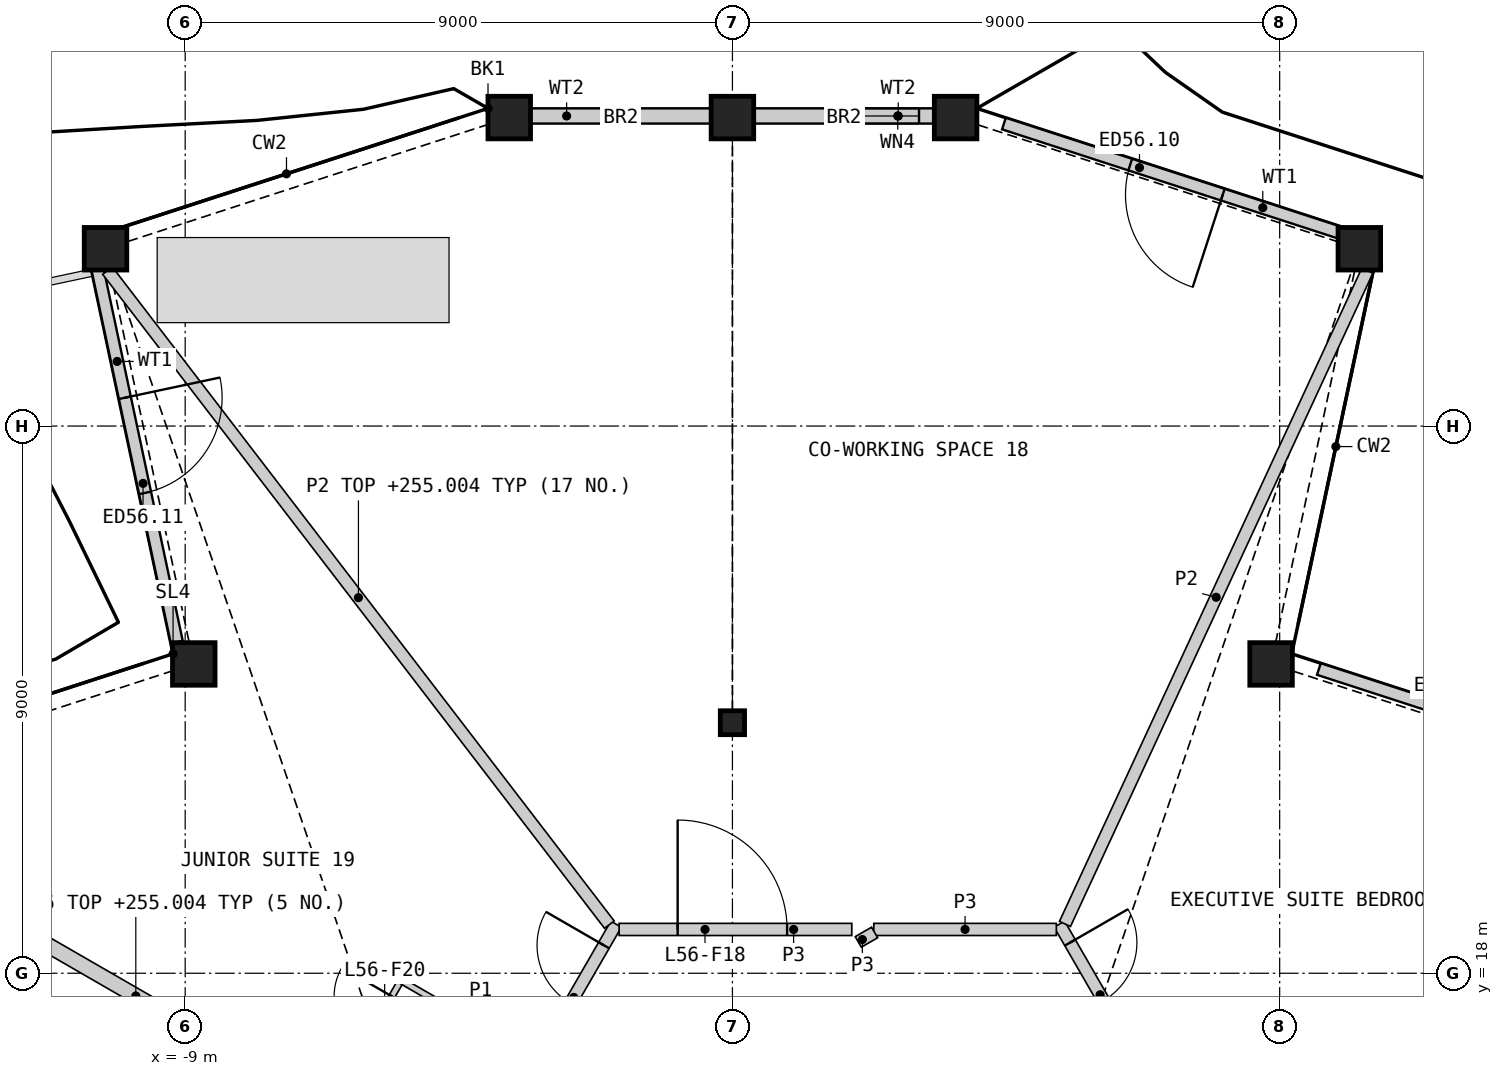
"""IFC4 building model, lengths in metres.
Left out: names, types, materials, properties, quantities, classifications, styles, units other than length and angle.
Written with IfcOpenShell. Run it as: python <this file> out.ifc"""

import sys

from ifc_helpers import new_model, si_unit, direction, frame, frame_2d, origin, origin_2d, place, context, subcontext, project, spatial, rectangle, hollow_rectangle, i_section, extrude, element, fill, save


model = new_model("IFC4")
c1 = context("Model", 3, precision=1e-05, world=origin(), true_north=direction((0.0, 1.0)))
c2 = subcontext(c1, "Body", "Model", "MODEL_VIEW")
j1 = project(units=[si_unit("LENGTHUNIT", "METRE"), si_unit("PLANEANGLEUNIT", "RADIAN")], contexts=[c1])
p1 = place(None, origin())
s1 = spatial("IfcSite", under=j1, at=p1, CompositionType="ELEMENT")
p2 = place(p1, origin())
s2 = spatial("IfcBuilding", under=s1, at=p2, CompositionType="ELEMENT")
p3 = place(p2, frame((0.0, 0.0, 252.6)))
s3 = spatial("IfcBuildingStorey", under=s2, at=p3, CompositionType="ELEMENT", Elevation=252.6)
for number, where, z_axis, x_axis in (
    (1, (8.859, 23.087, 0.0), (0.0, 0.0, 1.0), (1.0, 0.0, 0.0)),
    (2, (10.31, 29.916, 0.0), (0.0, 0.0, 1.0), (1.0, 0.0, 0.0)),
    (3, (3.67, 32.073, 0.0), (0.0, 0.0, 1.0), (1.0, 0.0, 0.0)),
    (4, (0.0, 32.073, 0.0), (0.0, 0.0, 1.0), (1.0, 0.0, 0.0)),
    (5, (-3.67, 32.073, 0.0), (0.0, 0.0, 1.0), (1.0, 0.0, 0.0)),
    (6, (-10.31, 29.916, 0.0), (0.0, 0.0, 1.0), (1.0, 0.0, 0.0)),
    (7, (-8.859, 23.087, 0.0), (0.0, 0.0, 1.0), (1.0, 0.0, 0.0)),
):
    element("IfcColumn", number, at=place(p3, frame(where, z_axis=z_axis, x_axis=x_axis)), inside=s3, PredefinedType="COLUMN", context=c2, shape_type="SweptSolid", body=[
        extrude(hollow_rectangle(XDim=0.7, YDim=0.7, WallThickness=0.045, at=origin_2d()), origin(), (0.0, 0.0, 1.0), 3.6),
    ])
p4 = place(p3, frame((0.0, 22.121, 0.0), z_axis=(0.0, 0.0, 1.0), x_axis=(1.0, 0.0, 0.0)))
e8 = element("IfcColumn", 8, at=p4, inside=s3, PredefinedType="COLUMN", context=c2, shape_type="SweptSolid", body=[
    extrude(i_section(OverallWidth=0.399, OverallDepth=0.393, WebThickness=0.023, FlangeThickness=0.037, at=origin_2d()), origin(), (0.0, 0.0, 1.0), 3.6),
])
p5 = place(p3, frame((15.321, 21.159, 0.0), z_axis=(0.0, 0.0, 1.0), x_axis=(-0.951053307318, 0.309026870418, 0.0)))
e9 = element("IfcWall", 9, at=p5, inside=s3, PredefinedType="SOLIDWALL", context=c2, shape_type="SweptSolid", body=[
    extrude(rectangle(XDim=5.968, YDim=0.2, at=frame_2d((2.984, 0.0))), origin(), (0.0, 0.0, 1.0), 2.701),
])
p6 = place(p5, frame((2.184, 0.0, 0.0)))
e10 = element("IfcOpeningElement", 10, at=p6, cuts=e9, PredefinedType="OPENING", context=c2, shape_type="SweptSolid", body=[
    extrude(rectangle(XDim=1.6, YDim=2.4, at=frame_2d((0.8, 1.2))), frame((0.0, 0.11, 0.0), z_axis=(0.0, -1.0, 0.0), x_axis=(1.0, 0.0, 0.0)), (0.0, 0.0, 1.0), 0.22),
])
p7 = place(p3, frame((10.141, 30.131, 0.0), z_axis=(0.0, 0.0, 1.0), x_axis=(-0.951049400374, 0.309038894069, 0.0)))
e11 = element("IfcWall", 11, at=p7, inside=s3, PredefinedType="SOLIDWALL", context=c2, shape_type="SweptSolid", body=[
    extrude(rectangle(XDim=5.968, YDim=0.2, at=frame_2d((2.984, 0.0))), origin(), (0.0, 0.0, 1.0), 2.701),
])
p8 = place(p7, frame((2.184, 0.0, 0.0)))
e12 = element("IfcOpeningElement", 12, at=p8, cuts=e11, PredefinedType="OPENING", context=c2, shape_type="SweptSolid", body=[
    extrude(rectangle(XDim=1.6, YDim=2.4, at=frame_2d((0.8, 1.2))), frame((0.0, 0.11, 0.0), z_axis=(0.0, -1.0, 0.0), x_axis=(1.0, 0.0, 0.0)), (0.0, 0.0, 1.0), 0.22),
])
p9 = place(p3, frame((3.519, 32.1, 0.0), z_axis=(0.0, 0.0, 1.0), x_axis=(-1.0, 0.0, 0.0)))
e13 = element("IfcWall", 13, at=p9, inside=s3, PredefinedType="SOLIDWALL", context=c2, shape_type="SweptSolid", body=[
    extrude(rectangle(XDim=3.169, YDim=0.25, at=frame_2d((1.584, 0.0))), origin(), (0.0, 0.0, 1.0), 2.701),
])
p10 = place(p9, frame((0.45, 0.0, 1.8)))
e14 = element("IfcOpeningElement", 14, at=p10, cuts=e13, PredefinedType="OPENING", context=c2, shape_type="SweptSolid", body=[
    extrude(rectangle(XDim=1.4, YDim=0.7, at=frame_2d((0.7, 0.35))), frame((0.0, 0.135, 0.0), z_axis=(0.0, -1.0, 0.0), x_axis=(1.0, 0.0, 0.0)), (0.0, 0.0, 1.0), 0.27),
])
p11 = place(p3, frame((-0.35, 32.1, 0.0), z_axis=(0.0, 0.0, 1.0), x_axis=(-1.0, 0.0, 0.0)))
e15 = element("IfcWall", 15, at=p11, inside=s3, PredefinedType="SOLIDWALL", context=c2, shape_type="SweptSolid", body=[
    extrude(rectangle(XDim=3.169, YDim=0.25, at=frame_2d((1.584, 0.0))), origin(), (0.0, 0.0, 1.0), 2.701),
])
p12 = place(p3, frame((-10.446, 29.602, 0.0), z_axis=(0.0, 0.0, 1.0), x_axis=(0.207926028339, -0.97814455309, 0.0)))
e16 = element("IfcWall", 16, at=p12, inside=s3, PredefinedType="SOLIDWALL", context=c2, shape_type="SweptSolid", body=[
    extrude(rectangle(XDim=6.293, YDim=0.2, at=frame_2d((3.147, 0.0))), origin(), (0.0, 0.0, 1.0), 2.701),
])
p13 = place(p12, frame((2.184, 0.0, 0.0)))
e17 = element("IfcOpeningElement", 17, at=p13, cuts=e16, PredefinedType="OPENING", context=c2, shape_type="SweptSolid", body=[
    extrude(rectangle(XDim=1.6, YDim=2.4, at=frame_2d((0.8, 1.2))), frame((0.0, 0.11, 0.0), z_axis=(0.0, -1.0, 0.0), x_axis=(1.0, 0.0, 0.0)), (0.0, 0.0, 1.0), 0.22),
])
p14 = place(p3, frame((5.377, 18.807, 0.0), z_axis=(0.0, 0.0, 1.0), x_axis=(0.499999852422, -0.866025488988, 0.0)))
e18 = element("IfcWall", 18, at=p14, inside=s3, PredefinedType="PARTITIONING", context=c2, shape_type="SweptSolid", body=[
    extrude(rectangle(XDim=27.198, YDim=0.2, at=frame_2d((13.599, 0.0))), origin(), (0.0, 0.0, 1.0), 3.25),
])
p15 = place(p14, frame((25.096, 0.0, 0.0)))
e19 = element("IfcOpeningElement", 19, at=p15, cuts=e18, PredefinedType="OPENING", context=c2, shape_type="SweptSolid", body=[
    extrude(rectangle(XDim=0.95, YDim=2.1, at=frame_2d((0.475, 1.05))), frame((0.0, 0.11, 0.0), z_axis=(0.0, -1.0, 0.0), x_axis=(1.0, 0.0, 0.0)), (0.0, 0.0, 1.0), 0.22),
])
p16 = place(p14, frame((19.122, 0.0, 0.0)))
e20 = element("IfcOpeningElement", 20, at=p16, cuts=e18, PredefinedType="OPENING", context=c2, shape_type="SweptSolid", body=[
    extrude(rectangle(XDim=1.0, YDim=2.1, at=frame_2d((0.5, 1.05))), frame((0.0, 0.11, 0.0), z_axis=(0.0, -1.0, 0.0), x_axis=(1.0, 0.0, 0.0)), (0.0, 0.0, 1.0), 0.22),
])
p17 = place(p14, frame((17.115, 0.0, 0.0)))
e21 = element("IfcOpeningElement", 21, at=p17, cuts=e18, PredefinedType="OPENING", context=c2, shape_type="SweptSolid", body=[
    extrude(rectangle(XDim=1.1, YDim=2.1, at=frame_2d((0.55, 1.05))), frame((0.0, 0.11, 0.0), z_axis=(0.0, -1.0, 0.0), x_axis=(1.0, 0.0, 0.0)), (0.0, 0.0, 1.0), 0.22),
])
p18 = place(p14, frame((0.35, 0.0, 0.0)))
e22 = element("IfcOpeningElement", 22, at=p18, cuts=e18, PredefinedType="OPENING", context=c2, shape_type="SweptSolid", body=[
    extrude(rectangle(XDim=1.1, YDim=2.1, at=frame_2d((0.55, 1.05))), frame((0.0, 0.11, 0.0), z_axis=(0.0, -1.0, 0.0), x_axis=(1.0, 0.0, 0.0)), (0.0, 0.0, 1.0), 0.22),
])
p19 = place(p3, frame((-15.138, 20.702, 0.0), z_axis=(0.0, 0.0, 1.0), x_axis=(0.86602627735, -0.499998486937, 0.0)))
e23 = element("IfcWall", 23, at=p19, inside=s3, PredefinedType="PARTITIONING", context=c2, shape_type="SweptSolid", body=[
    extrude(rectangle(XDim=12.301, YDim=0.25, at=frame_2d((6.15, 0.0))), origin(), (0.0, 0.0, 1.0), 2.404),
])
p20 = place(p3, frame((-4.668, 14.035, 0.0), z_axis=(0.0, 0.0, 1.0), x_axis=(0.499984524817, 0.866034338201, 0.0)))
e24 = element("IfcWall", 24, at=p20, inside=s3, PredefinedType="PARTITIONING", context=c2, shape_type="SweptSolid", body=[
    extrude(rectangle(XDim=5.51, YDim=0.2, at=frame_2d((2.755, 0.0))), origin(), (0.0, 0.0, 1.0), 3.25),
])
p21 = place(p20, frame((4.01, 0.0, 0.0)))
e25 = element("IfcOpeningElement", 25, at=p21, cuts=e24, PredefinedType="OPENING", context=c2, shape_type="SweptSolid", body=[
    extrude(rectangle(XDim=1.1, YDim=2.1, at=frame_2d((0.55, 1.05))), frame((0.0, 0.11, 0.0), z_axis=(0.0, -1.0, 0.0), x_axis=(1.0, 0.0, 0.0)), (0.0, 0.0, 1.0), 0.22),
])
p22 = place(p3, frame((-1.863, 18.72, 0.0), z_axis=(0.0, 0.0, 1.0), x_axis=(1.0, 0.0, 0.0)))
e26 = element("IfcWall", 26, at=p22, inside=s3, PredefinedType="PARTITIONING", context=c2, shape_type="SweptSolid", body=[
    extrude(rectangle(XDim=3.826, YDim=0.2, at=frame_2d((1.913, 0.0))), origin(), (0.0, 0.0, 1.0), 3.25),
])
p23 = place(p22, frame((0.962, 0.0, 0.0)))
e27 = element("IfcOpeningElement", 27, at=p23, cuts=e26, PredefinedType="OPENING", context=c2, shape_type="SweptSolid", body=[
    extrude(rectangle(XDim=1.8, YDim=2.1, at=frame_2d((0.9, 1.05))), frame((0.0, 0.11, 0.0), z_axis=(0.0, -1.0, 0.0), x_axis=(1.0, 0.0, 0.0)), (0.0, 0.0, 1.0), 0.22),
])
p24 = place(p3, frame((2.325, 18.72, 0.0), z_axis=(0.0, 0.0, 1.0), x_axis=(1.0, 0.0, 0.0)))
e28 = element("IfcWall", 28, at=p24, inside=s3, PredefinedType="PARTITIONING", context=c2, shape_type="SweptSolid", body=[
    extrude(rectangle(XDim=3.002, YDim=0.2, at=frame_2d((1.501, 0.0))), origin(), (0.0, 0.0, 1.0), 3.25),
])
p25 = place(p3, frame((2.07, 18.515, 0.0), z_axis=(0.0, 0.0, 1.0), x_axis=(0.866054481515, 0.499949632511, 0.0)))
e29 = element("IfcWall", 29, at=p25, inside=s3, PredefinedType="PARTITIONING", context=c2, shape_type="SweptSolid", body=[
    extrude(rectangle(XDim=0.31, YDim=0.2, at=frame_2d((0.155, 0.0))), origin(), (0.0, 0.0, 1.0), 3.25),
])
p26 = place(p3, frame((-10.277, 29.556, 0.0), z_axis=(0.0, 0.0, 1.0), x_axis=(0.60876001101, -0.793354428358, 0.0)))
e30 = element("IfcWall", 30, at=p26, inside=s3, PredefinedType="PARTITIONING", context=c2, shape_type="SweptSolid", body=[
    extrude(rectangle(XDim=13.558, YDim=0.2, at=frame_2d((6.779, 0.0))), origin(), (0.0, 0.0, 1.0), 2.404),
])
p27 = place(p3, frame((5.469, 18.811, 0.0), z_axis=(0.0, 0.0, 1.0), x_axis=(0.419996836618, 0.907525568362, 0.0)))
e31 = element("IfcWall", 31, at=p27, inside=s3, PredefinedType="PARTITIONING", context=c2, shape_type="SweptSolid", body=[
    extrude(rectangle(XDim=11.84, YDim=0.2, at=frame_2d((5.92, 0.0))), origin(), (0.0, 0.0, 1.0), 2.404),
])
p28 = place(p3, frame((-5.494, 17.905, 0.0), z_axis=(0.0, 0.0, 1.0), x_axis=(0.866030925526, -0.499990435942, 0.0)))
e32 = element("IfcWall", 32, at=p28, inside=s3, PredefinedType="PARTITIONING", context=c2, shape_type="SweptSolid", body=[
    extrude(rectangle(XDim=2.55, YDim=0.1, at=frame_2d((1.275, 0.0))), origin(), (0.0, 0.0, 1.0), 2.404),
])
p29 = place(p3, frame((-6.588, 15.909, 0.0), z_axis=(0.0, 0.0, 1.0), x_axis=(0.49999788721, 0.866026623601, 0.0)))
e33 = element("IfcWall", 33, at=p29, inside=s3, PredefinedType="PARTITIONING", context=c2, shape_type="SweptSolid", body=[
    extrude(rectangle(XDim=2.225, YDim=0.1, at=frame_2d((1.113, 0.0))), origin(), (0.0, 0.0, 1.0), 2.404),
])
p30 = place(p29, frame((1.025, 0.0, 0.0)))
e34 = element("IfcOpeningElement", 34, at=p30, cuts=e33, PredefinedType="OPENING", context=c2, shape_type="SweptSolid", body=[
    extrude(rectangle(XDim=0.95, YDim=2.1, at=frame_2d((0.475, 1.05))), frame((0.0, 0.06, 0.0), z_axis=(0.0, -1.0, 0.0), x_axis=(1.0, 0.0, 0.0)), (0.0, 0.0, 1.0), 0.12),
])
p31 = place(p8, origin())
e35 = element("IfcDoor", 35, at=p31, inside=s3, OperationType="DOUBLE_DOOR_SINGLE_SWING", PredefinedType="DOOR", context=c2, shape_type="SweptSolid", body=[
    extrude(rectangle(XDim=1.6, YDim=2.4, at=frame_2d((0.8, 1.2))), frame((0.0, 0.025, 0.0), z_axis=(0.0, -1.0, 0.0), x_axis=(1.0, 0.0, 0.0)), (0.0, 0.0, 1.0), 0.05),
])
fill(e12, e35)
p32 = place(p10, origin())
e36 = element("IfcWindow", 36, at=p32, inside=s3, PartitioningType="SINGLE_PANEL", PredefinedType="WINDOW", context=c2, shape_type="SweptSolid", body=[
    extrude(rectangle(XDim=1.4, YDim=0.7, at=frame_2d((0.7, 0.35))), frame((0.0, 0.03, 0.0), z_axis=(0.0, -1.0, 0.0), x_axis=(1.0, 0.0, 0.0)), (0.0, 0.0, 1.0), 0.06),
])
fill(e14, e36)
p33 = place(p13, origin())
e37 = element("IfcDoor", 37, at=p33, inside=s3, OperationType="DOUBLE_DOOR_SINGLE_SWING", PredefinedType="DOOR", context=c2, shape_type="SweptSolid", body=[
    extrude(rectangle(XDim=1.6, YDim=2.4, at=frame_2d((0.8, 1.2))), frame((0.0, 0.025, 0.0), z_axis=(0.0, -1.0, 0.0), x_axis=(1.0, 0.0, 0.0)), (0.0, 0.0, 1.0), 0.05),
])
fill(e17, e37)
p34 = place(p18, origin())
e38 = element("IfcDoor", 38, at=p34, inside=s3, OperationType="SINGLE_SWING_LEFT", PredefinedType="DOOR", context=c2, shape_type="SweptSolid", body=[
    extrude(rectangle(XDim=1.1, YDim=2.1, at=frame_2d((0.55, 1.05))), frame((0.0, 0.025, 0.0), z_axis=(0.0, -1.0, 0.0), x_axis=(1.0, 0.0, 0.0)), (0.0, 0.0, 1.0), 0.05),
])
fill(e22, e38)
p35 = place(p23, origin())
e39 = element("IfcDoor", 39, at=p35, inside=s3, OperationType="DOUBLE_DOOR_SINGLE_SWING", PredefinedType="DOOR", context=c2, shape_type="SweptSolid", body=[
    extrude(rectangle(XDim=1.8, YDim=2.1, at=frame_2d((0.9, 1.05))), frame((0.0, 0.025, 0.0), z_axis=(0.0, -1.0, 0.0), x_axis=(1.0, 0.0, 0.0)), (0.0, 0.0, 1.0), 0.05),
])
fill(e27, e39)
p36 = place(p21, origin())
e40 = element("IfcDoor", 40, at=p36, inside=s3, OperationType="SINGLE_SWING_RIGHT", PredefinedType="DOOR", context=c2, shape_type="SweptSolid", body=[
    extrude(rectangle(XDim=1.1, YDim=2.1, at=frame_2d((0.55, 1.05))), frame((0.0, 0.025, 0.0), z_axis=(0.0, -1.0, 0.0), x_axis=(1.0, 0.0, 0.0)), (0.0, 0.0, 1.0), 0.05),
])
fill(e25, e40)
p37 = place(p30, origin())
e41 = element("IfcDoor", 41, at=p37, inside=s3, OperationType="SINGLE_SWING_RIGHT", PredefinedType="DOOR", context=c2, shape_type="SweptSolid", body=[
    extrude(rectangle(XDim=0.95, YDim=2.1, at=frame_2d((0.475, 1.05))), frame((0.0, 0.025, 0.0), z_axis=(0.0, -1.0, 0.0), x_axis=(1.0, 0.0, 0.0)), (0.0, 0.0, 1.0), 0.05),
])
fill(e34, e41)
save(model, sys.argv[1])
